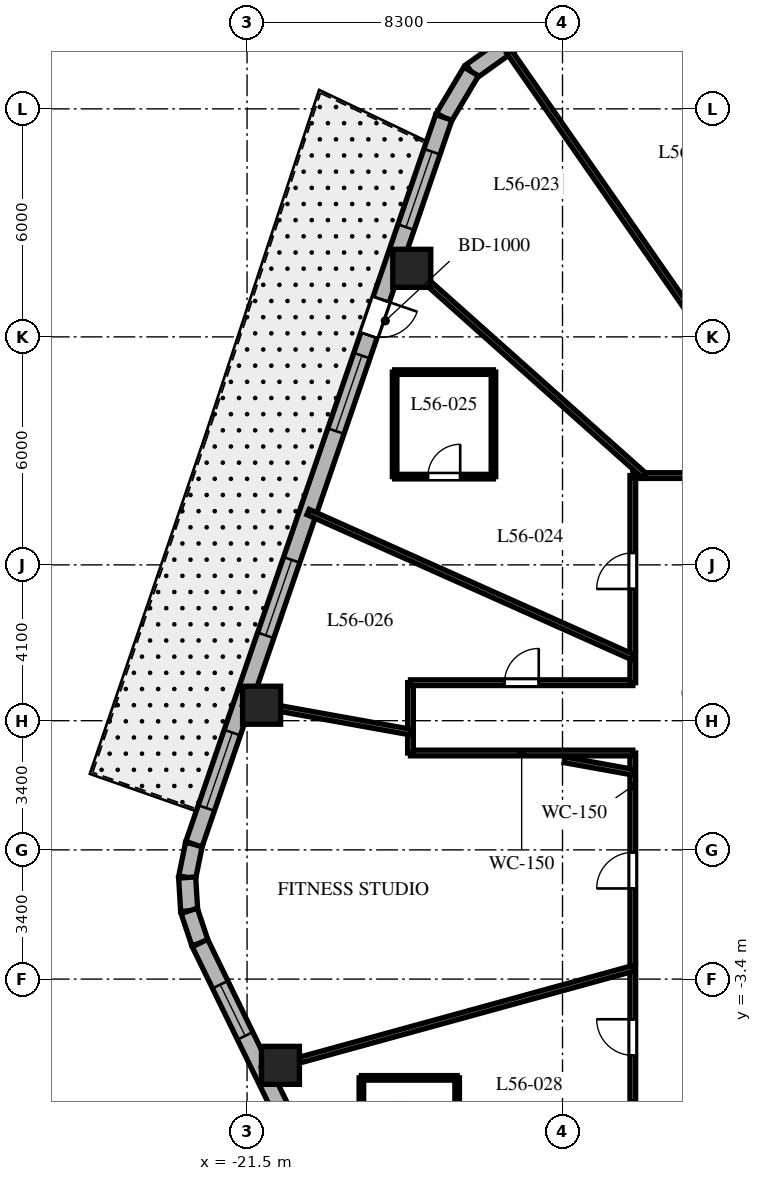
"""IFC4 building model, lengths in metres.
Left out: names, types, materials, properties, quantities, classifications, styles, units other than length and angle.
Written with IfcOpenShell. Run it as: python <this file> out.ifc"""

import sys

from ifc_helpers import new_model, si_unit, direction, frame, frame_2d, origin, origin_2d, place, context, subcontext, project, spatial, rectangle, extrude, element, fill, save


model = new_model("IFC4")
c1 = context("Model", 3, precision=1e-05, world=origin(), true_north=direction((0.0, 1.0)))
c2 = subcontext(c1, "Body", "Model", "MODEL_VIEW")
j1 = project(units=[si_unit("LENGTHUNIT", "METRE"), si_unit("PLANEANGLEUNIT", "RADIAN")], contexts=[c1])
p1 = place(None, origin())
s1 = spatial("IfcSite", under=j1, at=p1, CompositionType="ELEMENT")
p2 = place(p1, origin())
s2 = spatial("IfcBuilding", under=s1, at=p2, CompositionType="ELEMENT")
p3 = place(p2, frame((0.0, 0.0, 225.5)))
s3 = spatial("IfcBuildingStorey", under=s2, at=p3, CompositionType="ELEMENT", Elevation=225.5)
for number, where, z_axis, x_axis in (
    (1, (-17.166, 15.304, 0.0), (0.0, 0.0, 1.0), (1.0, 0.0, 0.0)),
    (2, (-21.118, 3.807, 0.0), (0.0, 0.0, 1.0), (1.0, 0.0, 0.0)),
    (3, (-20.622, -5.67, 0.0), (0.0, 0.0, 1.0), (1.0, 0.0, 0.0)),
):
    element("IfcColumn", number, at=place(p3, frame(where, z_axis=z_axis, x_axis=x_axis)), inside=s3, PredefinedType="COLUMN", context=c2, shape_type="SweptSolid", body=[
        extrude(rectangle(XDim=1.0, YDim=1.0, at=origin_2d()), origin(), (0.0, 0.0, 1.0), 3.8),
    ])
p4 = place(p3, frame((-14.478, 21.287, 0.0), z_axis=(0.0, 0.0, 1.0), x_axis=(-0.813888518617, -0.58102106611, 0.0)))
e4 = element("IfcWall", 4, at=p4, inside=s3, PredefinedType="SOLIDWALL", context=c2, shape_type="SweptSolid", body=[
    extrude(rectangle(XDim=1.383, YDim=0.45, at=frame_2d((0.691, 0.0))), origin(), (0.0, 0.0, 1.0), 3.5),
])
p5 = place(p3, frame((-15.604, 20.483, 0.0), z_axis=(0.0, 0.0, 1.0), x_axis=(-0.512222149036, -0.858852996756, 0.0)))
e5 = element("IfcWall", 5, at=p5, inside=s3, PredefinedType="SOLIDWALL", context=c2, shape_type="SweptSolid", body=[
    extrude(rectangle(XDim=1.406, YDim=0.45, at=frame_2d((0.703, 0.0))), origin(), (0.0, 0.0, 1.0), 3.5),
])
p6 = place(p3, frame((-22.898, 0.15, 0.0), z_axis=(0.0, 0.0, 1.0), x_axis=(-0.199055826889, -0.979988151858, 0.0)))
e6 = element("IfcWall", 6, at=p6, inside=s3, PredefinedType="SOLIDWALL", context=c2, shape_type="SweptSolid", body=[
    extrude(rectangle(XDim=0.894, YDim=0.45, at=frame_2d((0.447, 0.0))), origin(), (0.0, 0.0, 1.0), 3.5),
])
p7 = place(p3, frame((-23.076, -0.727, 0.0), z_axis=(0.0, 0.0, 1.0), x_axis=(0.060805222108, -0.998149650586, 0.0)))
e7 = element("IfcWall", 7, at=p7, inside=s3, PredefinedType="SOLIDWALL", context=c2, shape_type="SweptSolid", body=[
    extrude(rectangle(XDim=0.879, YDim=0.45, at=frame_2d((0.44, 0.0))), origin(), (0.0, 0.0, 1.0), 3.5),
])
p8 = place(p3, frame((-23.023, -1.604, 0.0), z_axis=(0.0, 0.0, 1.0), x_axis=(0.316801227695, -0.948491951537, 0.0)))
e8 = element("IfcWall", 8, at=p8, inside=s3, PredefinedType="SOLIDWALL", context=c2, shape_type="SweptSolid", body=[
    extrude(rectangle(XDim=0.894, YDim=0.45, at=frame_2d((0.447, 0.0))), origin(), (0.0, 0.0, 1.0), 3.5),
])
p9 = place(p3, frame((-16.324, 19.275, 0.0), z_axis=(0.0, 0.0, 1.0), x_axis=(-0.325083142304, -0.945685439557, 0.0)))
e9 = element("IfcWall", 9, at=p9, inside=s3, PredefinedType="SOLIDWALL", context=c2, shape_type="SweptSolid", body=[
    extrude(rectangle(XDim=20.224, YDim=0.45, at=frame_2d((10.112, 0.0))), origin(), (0.0, 0.0, 1.0), 3.5),
])
p10 = place(p9, frame((5.062, 0.0, 0.0)))
e10 = element("IfcOpeningElement", 10, at=p10, cuts=e9, PredefinedType="OPENING", context=c2, shape_type="SweptSolid", body=[
    extrude(rectangle(XDim=1.0, YDim=2.15, at=frame_2d((0.5, 1.075))), frame((0.0, 0.235, 0.0), z_axis=(0.0, -1.0, 0.0), x_axis=(1.0, 0.0, 0.0)), (0.0, 0.0, 1.0), 0.47),
])
p11 = place(p9, frame((0.953, 0.0, 0.8)))
e11 = element("IfcOpeningElement", 11, at=p11, cuts=e9, PredefinedType="OPENING", context=c2, shape_type="SweptSolid", body=[
    extrude(rectangle(XDim=2.1, YDim=1.85, at=frame_2d((1.05, 0.925))), frame((0.0, 0.235, 0.0), z_axis=(0.0, -1.0, 0.0), x_axis=(1.0, 0.0, 0.0)), (0.0, 0.0, 1.0), 0.47),
])
p12 = place(p9, frame((6.629, 0.0, 0.8)))
e12 = element("IfcOpeningElement", 12, at=p12, cuts=e9, PredefinedType="OPENING", context=c2, shape_type="SweptSolid", body=[
    extrude(rectangle(XDim=2.1, YDim=1.85, at=frame_2d((1.05, 0.925))), frame((0.0, 0.235, 0.0), z_axis=(0.0, -1.0, 0.0), x_axis=(1.0, 0.0, 0.0)), (0.0, 0.0, 1.0), 0.47),
])
p13 = place(p9, frame((12.312, 0.0, 0.8)))
e13 = element("IfcOpeningElement", 13, at=p13, cuts=e9, PredefinedType="OPENING", context=c2, shape_type="SweptSolid", body=[
    extrude(rectangle(XDim=2.1, YDim=1.85, at=frame_2d((1.05, 0.925))), frame((0.0, 0.235, 0.0), z_axis=(0.0, -1.0, 0.0), x_axis=(1.0, 0.0, 0.0)), (0.0, 0.0, 1.0), 0.47),
])
p14 = place(p9, frame((17.118, 0.0, 0.8)))
e14 = element("IfcOpeningElement", 14, at=p14, cuts=e9, PredefinedType="OPENING", context=c2, shape_type="SweptSolid", body=[
    extrude(rectangle(XDim=2.1, YDim=1.85, at=frame_2d((1.05, 0.925))), frame((0.0, 0.235, 0.0), z_axis=(0.0, -1.0, 0.0), x_axis=(1.0, 0.0, 0.0)), (0.0, 0.0, 1.0), 0.47),
])
p15 = place(p3, frame((-22.74, -2.452, 0.0), z_axis=(0.0, 0.0, 1.0), x_axis=(0.437753424814, -0.899095066755, 0.0)))
e15 = element("IfcWall", 15, at=p15, inside=s3, PredefinedType="SOLIDWALL", context=c2, shape_type="SweptSolid", body=[
    extrude(rectangle(XDim=19.137, YDim=0.45, at=frame_2d((9.569, 0.0))), origin(), (0.0, 0.0, 1.0), 3.5),
])
p16 = place(p15, frame((1.216, 0.0, 0.8)))
e16 = element("IfcOpeningElement", 16, at=p16, cuts=e15, PredefinedType="OPENING", context=c2, shape_type="SweptSolid", body=[
    extrude(rectangle(XDim=1.5, YDim=1.8, at=frame_2d((0.75, 0.9))), frame((0.0, 0.235, 0.0), z_axis=(0.0, -1.0, 0.0), x_axis=(1.0, 0.0, 0.0)), (0.0, 0.0, 1.0), 0.47),
])
p17 = place(p15, frame((6.105, 0.0, 0.8)))
e17 = element("IfcOpeningElement", 17, at=p17, cuts=e15, PredefinedType="OPENING", context=c2, shape_type="SweptSolid", body=[
    extrude(rectangle(XDim=1.5, YDim=1.8, at=frame_2d((0.75, 0.9))), frame((0.0, 0.235, 0.0), z_axis=(0.0, -1.0, 0.0), x_axis=(1.0, 0.0, 0.0)), (0.0, 0.0, 1.0), 0.47),
])
p18 = place(p15, frame((11.499, 0.0, 0.8)))
e18 = element("IfcOpeningElement", 18, at=p18, cuts=e15, PredefinedType="OPENING", context=c2, shape_type="SweptSolid", body=[
    extrude(rectangle(XDim=1.5, YDim=1.8, at=frame_2d((0.75, 0.9))), frame((0.0, 0.235, 0.0), z_axis=(0.0, -1.0, 0.0), x_axis=(1.0, 0.0, 0.0)), (0.0, 0.0, 1.0), 0.47),
])
p19 = place(p15, frame((16.473, 0.0, 0.8)))
e19 = element("IfcOpeningElement", 19, at=p19, cuts=e15, PredefinedType="OPENING", context=c2, shape_type="SweptSolid", body=[
    extrude(rectangle(XDim=1.5, YDim=1.8, at=frame_2d((0.75, 0.9))), frame((0.0, 0.235, 0.0), z_axis=(0.0, -1.0, 0.0), x_axis=(1.0, 0.0, 0.0)), (0.0, 0.0, 1.0), 0.47),
])
p20 = place(p3, frame((-11.35, -9.85, 0.0), z_axis=(0.0, 0.0, 1.0), x_axis=(0.0, 1.0, 0.0)))
e20 = element("IfcWall", 20, at=p20, inside=s3, PredefinedType="PARTITIONING", context=c2, shape_type="SweptSolid", body=[
    extrude(rectangle(XDim=12.4, YDim=0.15, at=frame_2d((6.2, 0.0))), origin(), (0.0, 0.0, 1.0), 2.99),
])
p21 = place(p20, frame((8.835, 0.0, 0.0)))
e21 = element("IfcOpeningElement", 21, at=p21, cuts=e20, PredefinedType="OPENING", context=c2, shape_type="SweptSolid", body=[
    extrude(rectangle(XDim=0.95, YDim=2.03, at=frame_2d((0.475, 1.015))), frame((0.0, 0.085, 0.0), z_axis=(0.0, -1.0, 0.0), x_axis=(1.0, 0.0, 0.0)), (0.0, 0.0, 1.0), 0.17),
])
p22 = place(p20, frame((4.443, 0.0, 0.0)))
e22 = element("IfcOpeningElement", 22, at=p22, cuts=e20, PredefinedType="OPENING", context=c2, shape_type="SweptSolid", body=[
    extrude(rectangle(XDim=0.95, YDim=2.03, at=frame_2d((0.475, 1.015))), frame((0.0, 0.085, 0.0), z_axis=(0.0, -1.0, 0.0), x_axis=(1.0, 0.0, 0.0)), (0.0, 0.0, 1.0), 0.17),
])
p23 = place(p20, frame((1.242, 0.0, 0.0)))
e23 = element("IfcOpeningElement", 23, at=p23, cuts=e20, PredefinedType="OPENING", context=c2, shape_type="SweptSolid", body=[
    extrude(rectangle(XDim=0.9, YDim=2.03, at=frame_2d((0.45, 1.015))), frame((0.0, 0.085, 0.0), z_axis=(0.0, -1.0, 0.0), x_axis=(1.0, 0.0, 0.0)), (0.0, 0.0, 1.0), 0.17),
])
p24 = place(p3, frame((-11.35, 2.55, 0.0), z_axis=(0.0, 0.0, 1.0), x_axis=(-1.0, 0.0, 0.0)))
e24 = element("IfcWall", 24, at=p24, inside=s3, PredefinedType="PARTITIONING", context=c2, shape_type="SweptSolid", body=[
    extrude(rectangle(XDim=5.85, YDim=0.15, at=frame_2d((2.925, 0.0))), origin(), (0.0, 0.0, 1.0), 2.94),
])
p25 = place(p3, frame((-17.2, 2.55, 0.0), z_axis=(0.0, 0.0, 1.0), x_axis=(0.0, 1.0, 0.0)))
e25 = element("IfcWall", 25, at=p25, inside=s3, PredefinedType="PARTITIONING", context=c2, shape_type="SweptSolid", body=[
    extrude(rectangle(XDim=1.85, YDim=0.15, at=frame_2d((0.925, 0.0))), origin(), (0.0, 0.0, 1.0), 2.94),
])
p26 = place(p3, frame((-17.2, 4.4, 0.0), z_axis=(0.0, 0.0, 1.0), x_axis=(1.0, 0.0, 0.0)))
e26 = element("IfcWall", 26, at=p26, inside=s3, PredefinedType="PARTITIONING", context=c2, shape_type="SweptSolid", body=[
    extrude(rectangle(XDim=5.85, YDim=0.15, at=frame_2d((2.925, 0.0))), origin(), (0.0, 0.0, 1.0), 2.94),
])
p27 = place(p26, frame((2.475, 0.0, 0.0)))
e27 = element("IfcOpeningElement", 27, at=p27, cuts=e26, PredefinedType="OPENING", context=c2, shape_type="SweptSolid", body=[
    extrude(rectangle(XDim=0.9, YDim=2.03, at=frame_2d((0.45, 1.015))), frame((0.0, 0.085, 0.0), z_axis=(0.0, -1.0, 0.0), x_axis=(1.0, 0.0, 0.0)), (0.0, 0.0, 1.0), 0.17),
])
p28 = place(p3, frame((-11.35, 4.4, 0.0), z_axis=(0.0, 0.0, 1.0), x_axis=(0.0, 1.0, 0.0)))
e28 = element("IfcWall", 28, at=p28, inside=s3, PredefinedType="PARTITIONING", context=c2, shape_type="SweptSolid", body=[
    extrude(rectangle(XDim=5.45, YDim=0.15, at=frame_2d((2.725, 0.0))), origin(), (0.0, 0.0, 1.0), 2.99),
])
p29 = place(p28, frame((2.466, 0.0, 0.0)))
e29 = element("IfcOpeningElement", 29, at=p29, cuts=e28, PredefinedType="OPENING", context=c2, shape_type="SweptSolid", body=[
    extrude(rectangle(XDim=0.95, YDim=2.03, at=frame_2d((0.475, 1.015))), frame((0.0, 0.085, 0.0), z_axis=(0.0, -1.0, 0.0), x_axis=(1.0, 0.0, 0.0)), (0.0, 0.0, 1.0), 0.17),
])
p30 = place(p3, frame((-11.35, 9.85, 0.0), z_axis=(0.0, 0.0, 1.0), x_axis=(1.0, 0.0, 0.0)))
e30 = element("IfcWall", 30, at=p30, inside=s3, PredefinedType="PARTITIONING", context=c2, shape_type="SweptSolid", body=[
    extrude(rectangle(XDim=10.43, YDim=0.15, at=frame_2d((5.215, 0.0))), origin(), (0.0, 0.0, 1.0), 2.99),
])
p31 = place(p30, frame((8.387, 0.0, 0.0)))
e31 = element("IfcOpeningElement", 31, at=p31, cuts=e30, PredefinedType="OPENING", context=c2, shape_type="SweptSolid", body=[
    extrude(rectangle(XDim=0.9, YDim=2.03, at=frame_2d((0.45, 1.015))), frame((0.0, 0.085, 0.0), z_axis=(0.0, -1.0, 0.0), x_axis=(1.0, 0.0, 0.0)), (0.0, 0.0, 1.0), 0.17),
])
p32 = place(p30, frame((5.525, 0.0, 0.0)))
e32 = element("IfcOpeningElement", 32, at=p32, cuts=e30, PredefinedType="OPENING", context=c2, shape_type="SweptSolid", body=[
    extrude(rectangle(XDim=0.9, YDim=2.03, at=frame_2d((0.45, 1.015))), frame((0.0, 0.085, 0.0), z_axis=(0.0, -1.0, 0.0), x_axis=(1.0, 0.0, 0.0)), (0.0, 0.0, 1.0), 0.17),
])
p33 = place(p30, frame((1.921, 0.0, 0.0)))
e33 = element("IfcOpeningElement", 33, at=p33, cuts=e30, PredefinedType="OPENING", context=c2, shape_type="SweptSolid", body=[
    extrude(rectangle(XDim=0.9, YDim=2.03, at=frame_2d((0.45, 1.015))), frame((0.0, 0.085, 0.0), z_axis=(0.0, -1.0, 0.0), x_axis=(1.0, 0.0, 0.0)), (0.0, 0.0, 1.0), 0.17),
])
p34 = place(p3, frame((-6.849, 9.85, 0.0), z_axis=(0.0, 0.0, 1.0), x_axis=(-0.570871709026, 0.821039275451, 0.0)))
e34 = element("IfcWall", 34, at=p34, inside=s3, PredefinedType="PARTITIONING", context=c2, shape_type="SweptSolid", body=[
    extrude(rectangle(XDim=13.582, YDim=0.15, at=frame_2d((6.791, 0.0))), origin(), (0.0, 0.0, 1.0), 2.74),
])
p35 = place(p3, frame((-11.048, 9.85, 0.0), z_axis=(0.0, 0.0, 1.0), x_axis=(-0.746444434655, 0.665447748492, 0.0)))
e35 = element("IfcWall", 35, at=p35, inside=s3, PredefinedType="PARTITIONING", context=c2, shape_type="SweptSolid", body=[
    extrude(rectangle(XDim=8.732, YDim=0.15, at=frame_2d((4.366, 0.0))), origin(), (0.0, 0.0, 1.0), 2.74),
])
p36 = place(p3, frame((-11.35, 5.072, 0.0), z_axis=(0.0, 0.0, 1.0), x_axis=(-0.912980177983, 0.408003914944, 0.0)))
e36 = element("IfcWall", 36, at=p36, inside=s3, PredefinedType="PARTITIONING", context=c2, shape_type="SweptSolid", body=[
    extrude(rectangle(XDim=9.358, YDim=0.15, at=frame_2d((4.679, 0.0))), origin(), (0.0, 0.0, 1.0), 2.74),
])
p37 = place(p3, frame((-11.35, 2.046, 0.0), z_axis=(0.0, 0.0, 1.0), x_axis=(-0.984127783205, 0.177461281195, 0.0)))
e37 = element("IfcWall", 37, at=p37, inside=s3, PredefinedType="PARTITIONING", context=c2, shape_type="SweptSolid", body=[
    extrude(rectangle(XDim=1.826, YDim=0.15, at=frame_2d((0.913, 0.0))), origin(), (0.0, 0.0, 1.0), 3.5),
])
p38 = place(p3, frame((-17.2, 3.101, 0.0), z_axis=(0.0, 0.0, 1.0), x_axis=(-0.98413465883, 0.177423147559, 0.0)))
e38 = element("IfcWall", 38, at=p38, inside=s3, PredefinedType="PARTITIONING", context=c2, shape_type="SweptSolid", body=[
    extrude(rectangle(XDim=4.482, YDim=0.15, at=frame_2d((2.241, 0.0))), origin(), (0.0, 0.0, 1.0), 2.74),
])
p39 = place(p3, frame((-11.35, -3.121, 0.0), z_axis=(0.0, 0.0, 1.0), x_axis=(-0.964212793822, -0.265129568758, 0.0)))
e39 = element("IfcWall", 39, at=p39, inside=s3, PredefinedType="PARTITIONING", context=c2, shape_type="SweptSolid", body=[
    extrude(rectangle(XDim=10.12, YDim=0.15, at=frame_2d((5.06, 0.0))), origin(), (0.0, 0.0, 1.0), 2.74),
])
p40 = place(p3, frame((-17.617, 9.823, 0.0), z_axis=(0.0, 0.0, 1.0), x_axis=(1.0, 0.0, 0.0)))
e40 = element("IfcWall", 40, at=p40, inside=s3, PredefinedType="PARTITIONING", context=c2, shape_type="SweptSolid", body=[
    extrude(rectangle(XDim=2.6, YDim=0.12, at=frame_2d((1.3, 0.0))), origin(), (0.0, 0.0, 1.0), 3.073),
])
p41 = place(p40, frame((0.875, 0.0, 0.0)))
e41 = element("IfcOpeningElement", 41, at=p41, cuts=e40, PredefinedType="OPENING", context=c2, shape_type="SweptSolid", body=[
    extrude(rectangle(XDim=0.85, YDim=2.03, at=frame_2d((0.425, 1.015))), frame((0.0, 0.07, 0.0), z_axis=(0.0, -1.0, 0.0), x_axis=(1.0, 0.0, 0.0)), (0.0, 0.0, 1.0), 0.14),
])
p42 = place(p3, frame((-15.017, 9.823, 0.0), z_axis=(0.0, 0.0, 1.0), x_axis=(0.0, 1.0, 0.0)))
e42 = element("IfcWall", 42, at=p42, inside=s3, PredefinedType="PARTITIONING", context=c2, shape_type="SweptSolid", body=[
    extrude(rectangle(XDim=2.75, YDim=0.12, at=frame_2d((1.375, 0.0))), origin(), (0.0, 0.0, 1.0), 3.073),
])
p43 = place(p3, frame((-15.017, 12.573, 0.0), z_axis=(0.0, 0.0, 1.0), x_axis=(-1.0, 0.0, 0.0)))
e43 = element("IfcWall", 43, at=p43, inside=s3, PredefinedType="PARTITIONING", context=c2, shape_type="SweptSolid", body=[
    extrude(rectangle(XDim=2.6, YDim=0.12, at=frame_2d((1.3, 0.0))), origin(), (0.0, 0.0, 1.0), 3.5),
])
p44 = place(p3, frame((-17.617, 12.573, 0.0), z_axis=(0.0, 0.0, 1.0), x_axis=(0.0, -1.0, 0.0)))
e44 = element("IfcWall", 44, at=p44, inside=s3, PredefinedType="PARTITIONING", context=c2, shape_type="SweptSolid", body=[
    extrude(rectangle(XDim=2.75, YDim=0.12, at=frame_2d((1.375, 0.0))), origin(), (0.0, 0.0, 1.0), 3.5),
])
p45 = place(p3, frame((-15.972, -8.679, 0.0), z_axis=(0.0, 0.0, 1.0), x_axis=(0.0, 1.0, 0.0)))
e45 = element("IfcWall", 45, at=p45, inside=s3, PredefinedType="PARTITIONING", context=c2, shape_type="SweptSolid", body=[
    extrude(rectangle(XDim=2.68, YDim=0.12, at=frame_2d((1.34, 0.0))), origin(), (0.0, 0.0, 1.0), 2.99),
])
p46 = place(p3, frame((-15.972, -5.999, 0.0), z_axis=(0.0, 0.0, 1.0), x_axis=(-1.0, 0.0, 0.0)))
e46 = element("IfcWall", 46, at=p46, inside=s3, PredefinedType="PARTITIONING", context=c2, shape_type="SweptSolid", body=[
    extrude(rectangle(XDim=2.52, YDim=0.12, at=frame_2d((1.26, 0.0))), origin(), (0.0, 0.0, 1.0), 2.94),
])
p47 = place(p3, frame((-18.492, -5.999, 0.0), z_axis=(0.0, 0.0, 1.0), x_axis=(0.0, -1.0, 0.0)))
e47 = element("IfcWall", 47, at=p47, inside=s3, PredefinedType="PARTITIONING", context=c2, shape_type="SweptSolid", body=[
    extrude(rectangle(XDim=2.68, YDim=0.12, at=frame_2d((1.34, 0.0))), origin(), (0.0, 0.0, 1.0), 2.99),
])
p48 = place(p10, origin())
e48 = element("IfcDoor", 48, at=p48, inside=s3, OperationType="SINGLE_SWING_LEFT", PredefinedType="DOOR", context=c2, shape_type="SweptSolid", body=[
    extrude(rectangle(XDim=1.0, YDim=2.15, at=frame_2d((0.5, 1.075))), frame((0.0, 0.025, 0.0), z_axis=(0.0, -1.0, 0.0), x_axis=(1.0, 0.0, 0.0)), (0.0, 0.0, 1.0), 0.05),
])
fill(e10, e48)
p49 = place(p11, origin())
e49 = element("IfcWindow", 49, at=p49, inside=s3, PartitioningType="SINGLE_PANEL", PredefinedType="WINDOW", context=c2, shape_type="SweptSolid", body=[
    extrude(rectangle(XDim=2.1, YDim=1.85, at=frame_2d((1.05, 0.925))), frame((0.0, 0.03, 0.0), z_axis=(0.0, -1.0, 0.0), x_axis=(1.0, 0.0, 0.0)), (0.0, 0.0, 1.0), 0.06),
])
fill(e11, e49)
p50 = place(p12, origin())
e50 = element("IfcWindow", 50, at=p50, inside=s3, PartitioningType="SINGLE_PANEL", PredefinedType="WINDOW", context=c2, shape_type="SweptSolid", body=[
    extrude(rectangle(XDim=2.1, YDim=1.85, at=frame_2d((1.05, 0.925))), frame((0.0, 0.03, 0.0), z_axis=(0.0, -1.0, 0.0), x_axis=(1.0, 0.0, 0.0)), (0.0, 0.0, 1.0), 0.06),
])
fill(e12, e50)
p51 = place(p13, origin())
e51 = element("IfcWindow", 51, at=p51, inside=s3, PartitioningType="SINGLE_PANEL", PredefinedType="WINDOW", context=c2, shape_type="SweptSolid", body=[
    extrude(rectangle(XDim=2.1, YDim=1.85, at=frame_2d((1.05, 0.925))), frame((0.0, 0.03, 0.0), z_axis=(0.0, -1.0, 0.0), x_axis=(1.0, 0.0, 0.0)), (0.0, 0.0, 1.0), 0.06),
])
fill(e13, e51)
p52 = place(p14, origin())
e52 = element("IfcWindow", 52, at=p52, inside=s3, PartitioningType="SINGLE_PANEL", PredefinedType="WINDOW", context=c2, shape_type="SweptSolid", body=[
    extrude(rectangle(XDim=2.1, YDim=1.85, at=frame_2d((1.05, 0.925))), frame((0.0, 0.03, 0.0), z_axis=(0.0, -1.0, 0.0), x_axis=(1.0, 0.0, 0.0)), (0.0, 0.0, 1.0), 0.06),
])
fill(e14, e52)
p53 = place(p16, origin())
e53 = element("IfcWindow", 53, at=p53, inside=s3, PartitioningType="SINGLE_PANEL", PredefinedType="WINDOW", context=c2, shape_type="SweptSolid", body=[
    extrude(rectangle(XDim=1.5, YDim=1.8, at=frame_2d((0.75, 0.9))), frame((0.0, 0.03, 0.0), z_axis=(0.0, -1.0, 0.0), x_axis=(1.0, 0.0, 0.0)), (0.0, 0.0, 1.0), 0.06),
])
fill(e16, e53)
p54 = place(p29, origin())
e54 = element("IfcDoor", 54, at=p54, inside=s3, OperationType="SINGLE_SWING_LEFT", PredefinedType="DOOR", context=c2, shape_type="SweptSolid", body=[
    extrude(rectangle(XDim=0.95, YDim=2.03, at=frame_2d((0.475, 1.015))), frame((0.0, 0.025, 0.0), z_axis=(0.0, -1.0, 0.0), x_axis=(1.0, 0.0, 0.0)), (0.0, 0.0, 1.0), 0.05),
])
fill(e29, e54)
p55 = place(p41, origin())
e55 = element("IfcDoor", 55, at=p55, inside=s3, OperationType="SINGLE_SWING_RIGHT", PredefinedType="DOOR", context=c2, shape_type="SweptSolid", body=[
    extrude(rectangle(XDim=0.85, YDim=2.03, at=frame_2d((0.425, 1.015))), frame((0.0, 0.025, 0.0), z_axis=(0.0, -1.0, 0.0), x_axis=(1.0, 0.0, 0.0)), (0.0, 0.0, 1.0), 0.05),
])
fill(e41, e55)
p56 = place(p27, origin())
e56 = element("IfcDoor", 56, at=p56, inside=s3, OperationType="SINGLE_SWING_RIGHT", PredefinedType="DOOR", context=c2, shape_type="SweptSolid", body=[
    extrude(rectangle(XDim=0.9, YDim=2.03, at=frame_2d((0.45, 1.015))), frame((0.0, 0.025, 0.0), z_axis=(0.0, -1.0, 0.0), x_axis=(1.0, 0.0, 0.0)), (0.0, 0.0, 1.0), 0.05),
])
fill(e27, e56)
p57 = place(p21, origin())
e57 = element("IfcDoor", 57, at=p57, inside=s3, OperationType="SINGLE_SWING_LEFT", PredefinedType="DOOR", context=c2, shape_type="SweptSolid", body=[
    extrude(rectangle(XDim=0.95, YDim=2.03, at=frame_2d((0.475, 1.015))), frame((0.0, 0.025, 0.0), z_axis=(0.0, -1.0, 0.0), x_axis=(1.0, 0.0, 0.0)), (0.0, 0.0, 1.0), 0.05),
])
fill(e21, e57)
p58 = place(p22, origin())
e58 = element("IfcDoor", 58, at=p58, inside=s3, OperationType="SINGLE_SWING_RIGHT", PredefinedType="DOOR", context=c2, shape_type="SweptSolid", body=[
    extrude(rectangle(XDim=0.95, YDim=2.03, at=frame_2d((0.475, 1.015))), frame((0.0, 0.025, 0.0), z_axis=(0.0, -1.0, 0.0), x_axis=(1.0, 0.0, 0.0)), (0.0, 0.0, 1.0), 0.05),
])
fill(e22, e58)
save(model, sys.argv[1])
